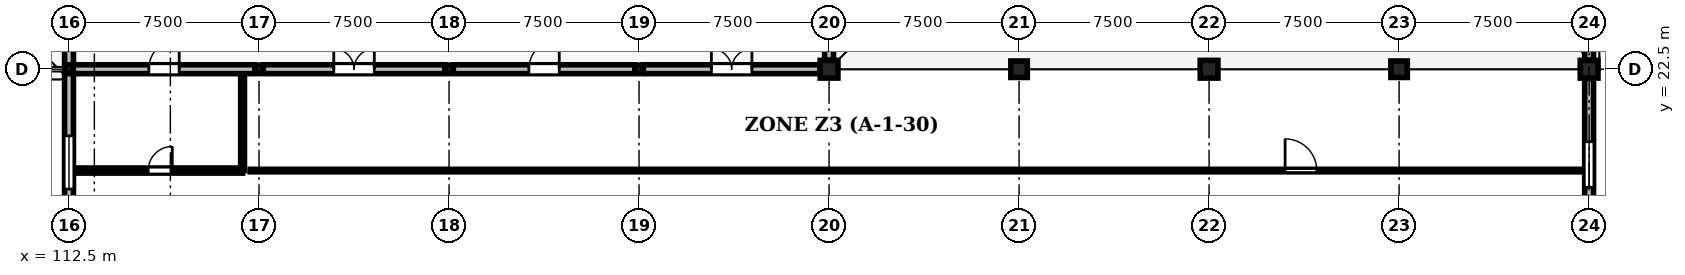
"""IFC4 building model, lengths in metres.
Left out: names, types, materials, properties, quantities, classifications, styles, units other than length and angle.
Written with IfcOpenShell. Run it as: python <this file> out.ifc"""

import sys

from ifc_helpers import new_model, si_unit, direction, frame, frame_2d, origin, origin_2d, place, context, subcontext, project, spatial, rectangle, extrude, element, fill, save


model = new_model("IFC4")
c1 = context("Model", 3, precision=1e-05, world=origin(), true_north=direction((0.0, 1.0)))
c2 = subcontext(c1, "Body", "Model", "MODEL_VIEW")
j1 = project(units=[si_unit("LENGTHUNIT", "METRE"), si_unit("PLANEANGLEUNIT", "RADIAN")], contexts=[c1])
p1 = place(None, origin())
s1 = spatial("IfcSite", under=j1, at=p1, CompositionType="ELEMENT")
p2 = place(p1, origin())
s2 = spatial("IfcBuilding", under=s1, at=p2, CompositionType="ELEMENT")
p3 = place(p2, frame((0.0, 0.0, 9.3)))
s3 = spatial("IfcBuildingStorey", under=s2, at=p3, CompositionType="ELEMENT", Elevation=9.3)
for number, where, z_axis, x_axis in (
    (1, (112.5, 22.5, 0.0), (0.0, 0.0, 1.0), (1.0, 0.0, 0.0)),
    (2, (120.0, 22.5, 0.0), (0.0, 0.0, 1.0), (1.0, 0.0, 0.0)),
    (3, (127.5, 22.5, 0.0), (0.0, 0.0, 1.0), (1.0, 0.0, 0.0)),
    (4, (135.0, 22.5, 0.0), (0.0, 0.0, 1.0), (1.0, 0.0, 0.0)),
):
    element("IfcColumn", number, at=place(p3, frame(where, z_axis=z_axis, x_axis=x_axis)), inside=s3, PredefinedType="COLUMN", context=c2, shape_type="SweptSolid", body=[
        extrude(rectangle(XDim=0.32, YDim=0.32, at=origin_2d()), origin(), (0.0, 0.0, 1.0), 4.8),
    ])
p4 = place(p3, frame((142.5, 22.5, 0.0), z_axis=(0.0, 0.0, 1.0), x_axis=(1.0, 0.0, 0.0)))
e5 = element("IfcColumn", 5, at=p4, inside=s3, PredefinedType="COLUMN", context=c2, shape_type="SweptSolid", body=[
    extrude(rectangle(XDim=0.7, YDim=0.7, at=origin_2d()), origin(), (0.0, 0.0, 1.0), 4.8),
])
p5 = place(p3, frame((150.0, 22.5, 0.0), z_axis=(0.0, 0.0, 1.0), x_axis=(1.0, 0.0, 0.0)))
e6 = element("IfcColumn", 6, at=p5, inside=s3, PredefinedType="COLUMN", context=c2, shape_type="SweptSolid", body=[
    extrude(rectangle(XDim=0.65, YDim=0.65, at=origin_2d()), origin(), (0.0, 0.0, 1.0), 4.8),
])
p6 = place(p3, frame((157.5, 22.5, 0.0), z_axis=(0.0, 0.0, 1.0), x_axis=(1.0, 0.0, 0.0)))
e7 = element("IfcColumn", 7, at=p6, inside=s3, PredefinedType="COLUMN", context=c2, shape_type="SweptSolid", body=[
    extrude(rectangle(XDim=0.7, YDim=0.7, at=origin_2d()), origin(), (0.0, 0.0, 1.0), 4.8),
])
p7 = place(p3, frame((165.0, 22.5, 0.0), z_axis=(0.0, 0.0, 1.0), x_axis=(1.0, 0.0, 0.0)))
e8 = element("IfcColumn", 8, at=p7, inside=s3, PredefinedType="COLUMN", context=c2, shape_type="SweptSolid", body=[
    extrude(rectangle(XDim=0.65, YDim=0.65, at=origin_2d()), origin(), (0.0, 0.0, 1.0), 4.8),
])
p8 = place(p3, frame((172.5, 22.5, 0.0), z_axis=(0.0, 0.0, 1.0), x_axis=(1.0, 0.0, 0.0)))
e9 = element("IfcColumn", 9, at=p8, inside=s3, PredefinedType="COLUMN", context=c2, shape_type="SweptSolid", body=[
    extrude(rectangle(XDim=0.7, YDim=0.7, at=origin_2d()), origin(), (0.0, 0.0, 1.0), 4.8),
])
p9 = place(p3, frame((112.5, 31.265, 0.0), z_axis=(0.0, 0.0, 1.0), x_axis=(0.0, -1.0, 0.0)))
e10 = element("IfcWall", 10, at=p9, inside=s3, PredefinedType="STANDARD", context=c2, shape_type="SweptSolid", body=[
    extrude(rectangle(XDim=8.595, YDim=0.35, at=frame_2d((4.297, 0.0))), origin(), (0.0, 0.0, 1.0), 4.55),
])
p10 = place(p9, frame((3.698, 0.0, 0.0)))
e11 = element("IfcOpeningElement", 11, at=p10, cuts=e10, PredefinedType="OPENING", context=c2, shape_type="SweptSolid", body=[
    extrude(rectangle(XDim=1.2, YDim=2.3, at=frame_2d((0.6, 1.15))), frame((0.0, 0.185, 0.0), z_axis=(0.0, -1.0, 0.0), x_axis=(1.0, 0.0, 0.0)), (0.0, 0.0, 1.0), 0.37),
])
p11 = place(p3, frame((112.67, 22.5, 0.0), z_axis=(0.0, 0.0, 1.0), x_axis=(1.0, 0.0, 0.0)))
e12 = element("IfcWall", 12, at=p11, inside=s3, PredefinedType="STANDARD", context=c2, shape_type="SweptSolid", body=[
    extrude(rectangle(XDim=7.16, YDim=0.35, at=frame_2d((3.58, 0.0))), origin(), (0.0, 0.0, 1.0), 3.95),
])
p12 = place(p11, frame((2.98, 0.0, 0.0)))
e13 = element("IfcOpeningElement", 13, at=p12, cuts=e12, PredefinedType="OPENING", context=c2, shape_type="SweptSolid", body=[
    extrude(rectangle(XDim=1.2, YDim=2.3, at=frame_2d((0.6, 1.15))), frame((0.0, 0.185, 0.0), z_axis=(0.0, -1.0, 0.0), x_axis=(1.0, 0.0, 0.0)), (0.0, 0.0, 1.0), 0.37),
])
p13 = place(p3, frame((112.5, 15.31, 0.0), z_axis=(0.0, 0.0, 1.0), x_axis=(0.0, 1.0, 0.0)))
e14 = element("IfcWall", 14, at=p13, inside=s3, PredefinedType="STANDARD", context=c2, shape_type="SweptSolid", body=[
    extrude(rectangle(XDim=7.02, YDim=0.35, at=frame_2d((3.51, 0.0))), origin(), (0.0, 0.0, 1.0), 3.95),
])
p14 = place(p13, frame((2.46, 0.0, 0.9)))
e15 = element("IfcOpeningElement", 15, at=p14, cuts=e14, PredefinedType="OPENING", context=c2, shape_type="SweptSolid", body=[
    extrude(rectangle(XDim=2.1, YDim=2.1, at=frame_2d((1.05, 1.05))), frame((0.0, 0.185, 0.0), z_axis=(0.0, -1.0, 0.0), x_axis=(1.0, 0.0, 0.0)), (0.0, 0.0, 1.0), 0.37),
])
p15 = place(p3, frame((120.17, 22.5, 0.0), z_axis=(0.0, 0.0, 1.0), x_axis=(1.0, 0.0, 0.0)))
e16 = element("IfcWall", 16, at=p15, inside=s3, PredefinedType="STANDARD", context=c2, shape_type="SweptSolid", body=[
    extrude(rectangle(XDim=7.16, YDim=0.35, at=frame_2d((3.58, 0.0))), origin(), (0.0, 0.0, 1.0), 3.95),
])
p16 = place(p15, frame((2.78, 0.0, 0.0)))
e17 = element("IfcOpeningElement", 17, at=p16, cuts=e16, PredefinedType="OPENING", context=c2, shape_type="SweptSolid", body=[
    extrude(rectangle(XDim=1.6, YDim=2.35, at=frame_2d((0.8, 1.175))), frame((0.0, 0.185, 0.0), z_axis=(0.0, -1.0, 0.0), x_axis=(1.0, 0.0, 0.0)), (0.0, 0.0, 1.0), 0.37),
])
p17 = place(p3, frame((127.67, 22.5, 0.0), z_axis=(0.0, 0.0, 1.0), x_axis=(1.0, 0.0, 0.0)))
e18 = element("IfcWall", 18, at=p17, inside=s3, PredefinedType="STANDARD", context=c2, shape_type="SweptSolid", body=[
    extrude(rectangle(XDim=7.16, YDim=0.35, at=frame_2d((3.58, 0.0))), origin(), (0.0, 0.0, 1.0), 3.95),
])
p18 = place(p17, frame((2.98, 0.0, 0.0)))
e19 = element("IfcOpeningElement", 19, at=p18, cuts=e18, PredefinedType="OPENING", context=c2, shape_type="SweptSolid", body=[
    extrude(rectangle(XDim=1.2, YDim=2.3, at=frame_2d((0.6, 1.15))), frame((0.0, 0.185, 0.0), z_axis=(0.0, -1.0, 0.0), x_axis=(1.0, 0.0, 0.0)), (0.0, 0.0, 1.0), 0.37),
])
p19 = place(p3, frame((135.17, 22.5, 0.0), z_axis=(0.0, 0.0, 1.0), x_axis=(1.0, 0.0, 0.0)))
e20 = element("IfcWall", 20, at=p19, inside=s3, PredefinedType="STANDARD", context=c2, shape_type="SweptSolid", body=[
    extrude(rectangle(XDim=6.97, YDim=0.35, at=frame_2d((3.485, 0.0))), origin(), (0.0, 0.0, 1.0), 3.95),
])
p20 = place(p19, frame((2.685, 0.0, 0.0)))
e21 = element("IfcOpeningElement", 21, at=p20, cuts=e20, PredefinedType="OPENING", context=c2, shape_type="SweptSolid", body=[
    extrude(rectangle(XDim=1.6, YDim=2.35, at=frame_2d((0.8, 1.175))), frame((0.0, 0.185, 0.0), z_axis=(0.0, -1.0, 0.0), x_axis=(1.0, 0.0, 0.0)), (0.0, 0.0, 1.0), 0.37),
])
p21 = place(p3, frame((142.5, 22.86, 0.0), z_axis=(0.0, 0.0, 1.0), x_axis=(0.0, 1.0, 0.0)))
e22 = element("IfcWall", 22, at=p21, inside=s3, PredefinedType="STANDARD", context=c2, shape_type="SweptSolid", body=[
    extrude(rectangle(XDim=8.33, YDim=0.35, at=frame_2d((4.165, 0.0))), origin(), (0.0, 0.0, 1.0), 4.55),
])
p22 = place(p21, frame((3.565, 0.0, 0.0)))
e23 = element("IfcOpeningElement", 23, at=p22, cuts=e22, PredefinedType="OPENING", context=c2, shape_type="SweptSolid", body=[
    extrude(rectangle(XDim=1.2, YDim=2.3, at=frame_2d((0.6, 1.15))), frame((0.0, 0.185, 0.0), z_axis=(0.0, -1.0, 0.0), x_axis=(1.0, 0.0, 0.0)), (0.0, 0.0, 1.0), 0.37),
])
p23 = place(p3, frame((172.5, 22.14, 0.0), z_axis=(0.0, 0.0, 1.0), x_axis=(0.0, -1.0, 0.0)))
e24 = element("IfcWall", 24, at=p23, inside=s3, PredefinedType="STANDARD", context=c2, shape_type="SweptSolid", body=[
    extrude(rectangle(XDim=6.805, YDim=0.35, at=frame_2d((3.402, 0.0))), origin(), (0.0, 0.0, 1.0), 3.95),
])
p24 = place(p23, frame((2.502, 0.0, 0.9)))
e25 = element("IfcOpeningElement", 25, at=p24, cuts=e24, PredefinedType="OPENING", context=c2, shape_type="SweptSolid", body=[
    extrude(rectangle(XDim=1.8, YDim=1.8, at=frame_2d((0.9, 0.9))), frame((0.0, 0.185, 0.0), z_axis=(0.0, -1.0, 0.0), x_axis=(1.0, 0.0, 0.0)), (0.0, 0.0, 1.0), 0.37),
])
p25 = place(p3, frame((172.5, 31.19, 0.0), z_axis=(0.0, 0.0, 1.0), x_axis=(0.0, -1.0, 0.0)))
e26 = element("IfcWall", 26, at=p25, inside=s3, PredefinedType="STANDARD", context=c2, shape_type="SweptSolid", body=[
    extrude(rectangle(XDim=8.33, YDim=0.35, at=frame_2d((4.165, 0.0))), origin(), (0.0, 0.0, 1.0), 4.55),
])
p26 = place(p25, frame((3.265, 0.0, 0.9)))
e27 = element("IfcOpeningElement", 27, at=p26, cuts=e26, PredefinedType="OPENING", context=c2, shape_type="SweptSolid", body=[
    extrude(rectangle(XDim=1.8, YDim=2.4, at=frame_2d((0.9, 1.2))), frame((0.0, 0.185, 0.0), z_axis=(0.0, -1.0, 0.0), x_axis=(1.0, 0.0, 0.0)), (0.0, 0.0, 1.0), 0.37),
])
p27 = place(p3, frame((112.85, 18.5, 0.0), z_axis=(0.0, 0.0, 1.0), x_axis=(1.0, 0.0, 0.0)))
e28 = element("IfcWall", 28, at=p27, inside=s3, PredefinedType="STANDARD", context=c2, shape_type="SweptSolid", body=[
    extrude(rectangle(XDim=6.5, YDim=0.2, at=frame_2d((3.25, 0.0))), origin(), (0.0, 0.0, 1.0), 4.535),
])
p28 = place(p27, frame((2.775, 0.0, 0.0)))
e29 = element("IfcOpeningElement", 29, at=p28, cuts=e28, PredefinedType="OPENING", context=c2, shape_type="SweptSolid", body=[
    extrude(rectangle(XDim=0.95, YDim=2.15, at=frame_2d((0.475, 1.075))), frame((0.0, 0.11, 0.0), z_axis=(0.0, -1.0, 0.0), x_axis=(1.0, 0.0, 0.0)), (0.0, 0.0, 1.0), 0.22),
])
p29 = place(p3, frame((119.65, 18.5, 0.0), z_axis=(0.0, 0.0, 1.0), x_axis=(1.0, 0.0, 0.0)))
e30 = element("IfcWall", 30, at=p29, inside=s3, PredefinedType="PARTITIONING", context=c2, shape_type="SweptSolid", body=[
    extrude(rectangle(XDim=52.5, YDim=0.1, at=frame_2d((26.25, 0.0))), origin(), (0.0, 0.0, 1.0), 4.535),
])
p30 = place(p29, frame((40.85, 0.0, 0.0)))
e31 = element("IfcOpeningElement", 31, at=p30, cuts=e30, PredefinedType="OPENING", context=c2, shape_type="SweptSolid", body=[
    extrude(rectangle(XDim=1.25, YDim=2.2, at=frame_2d((0.625, 1.1))), frame((0.0, 0.06, 0.0), z_axis=(0.0, -1.0, 0.0), x_axis=(1.0, 0.0, 0.0)), (0.0, 0.0, 1.0), 0.12),
])
p31 = place(p3, frame((119.35, 18.5, 0.0), z_axis=(0.0, 0.0, 1.0), x_axis=(0.0, 1.0, 0.0)))
e32 = element("IfcWall", 32, at=p31, inside=s3, PredefinedType="PARTITIONING", context=c2, shape_type="SweptSolid", body=[
    extrude(rectangle(XDim=3.65, YDim=0.15, at=frame_2d((1.825, 0.0))), origin(), (0.0, 0.0, 1.0), 4.535),
])
p32 = place(p12, origin())
e33 = element("IfcDoor", 33, at=p32, inside=s3, OperationType="SINGLE_SWING_RIGHT", PredefinedType="DOOR", context=c2, shape_type="SweptSolid", body=[
    extrude(rectangle(XDim=1.2, YDim=2.3, at=frame_2d((0.6, 1.15))), frame((0.0, 0.025, 0.0), z_axis=(0.0, -1.0, 0.0), x_axis=(1.0, 0.0, 0.0)), (0.0, 0.0, 1.0), 0.05),
])
fill(e13, e33)
p33 = place(p14, origin())
e34 = element("IfcWindow", 34, at=p33, inside=s3, PartitioningType="SINGLE_PANEL", PredefinedType="WINDOW", context=c2, shape_type="SweptSolid", body=[
    extrude(rectangle(XDim=2.1, YDim=2.1, at=frame_2d((1.05, 1.05))), frame((0.0, 0.03, 0.0), z_axis=(0.0, -1.0, 0.0), x_axis=(1.0, 0.0, 0.0)), (0.0, 0.0, 1.0), 0.06),
])
fill(e15, e34)
p34 = place(p16, origin())
e35 = element("IfcDoor", 35, at=p34, inside=s3, OperationType="DOUBLE_DOOR_SINGLE_SWING", PredefinedType="DOOR", context=c2, shape_type="SweptSolid", body=[
    extrude(rectangle(XDim=1.6, YDim=2.35, at=frame_2d((0.8, 1.175))), frame((0.0, 0.025, 0.0), z_axis=(0.0, -1.0, 0.0), x_axis=(1.0, 0.0, 0.0)), (0.0, 0.0, 1.0), 0.05),
])
fill(e17, e35)
p35 = place(p18, origin())
e36 = element("IfcDoor", 36, at=p35, inside=s3, OperationType="SINGLE_SWING_RIGHT", PredefinedType="DOOR", context=c2, shape_type="SweptSolid", body=[
    extrude(rectangle(XDim=1.2, YDim=2.3, at=frame_2d((0.6, 1.15))), frame((0.0, 0.025, 0.0), z_axis=(0.0, -1.0, 0.0), x_axis=(1.0, 0.0, 0.0)), (0.0, 0.0, 1.0), 0.05),
])
fill(e19, e36)
p36 = place(p20, origin())
e37 = element("IfcDoor", 37, at=p36, inside=s3, OperationType="DOUBLE_DOOR_SINGLE_SWING", PredefinedType="DOOR", context=c2, shape_type="SweptSolid", body=[
    extrude(rectangle(XDim=1.6, YDim=2.35, at=frame_2d((0.8, 1.175))), frame((0.0, 0.025, 0.0), z_axis=(0.0, -1.0, 0.0), x_axis=(1.0, 0.0, 0.0)), (0.0, 0.0, 1.0), 0.05),
])
fill(e21, e37)
p37 = place(p24, origin())
e38 = element("IfcWindow", 38, at=p37, inside=s3, PartitioningType="SINGLE_PANEL", PredefinedType="WINDOW", context=c2, shape_type="SweptSolid", body=[
    extrude(rectangle(XDim=1.8, YDim=1.8, at=frame_2d((0.9, 0.9))), frame((0.0, 0.03, 0.0), z_axis=(0.0, -1.0, 0.0), x_axis=(1.0, 0.0, 0.0)), (0.0, 0.0, 1.0), 0.06),
])
fill(e25, e38)
p38 = place(p28, origin())
e39 = element("IfcDoor", 39, at=p38, inside=s3, OperationType="SINGLE_SWING_RIGHT", PredefinedType="DOOR", context=c2, shape_type="SweptSolid", body=[
    extrude(rectangle(XDim=0.95, YDim=2.15, at=frame_2d((0.475, 1.075))), frame((0.0, 0.025, 0.0), z_axis=(0.0, -1.0, 0.0), x_axis=(1.0, 0.0, 0.0)), (0.0, 0.0, 1.0), 0.05),
])
fill(e29, e39)
p39 = place(p30, origin())
e40 = element("IfcDoor", 40, at=p39, inside=s3, OperationType="SINGLE_SWING_LEFT", PredefinedType="DOOR", context=c2, shape_type="SweptSolid", body=[
    extrude(rectangle(XDim=1.25, YDim=2.2, at=frame_2d((0.625, 1.1))), frame((0.0, 0.025, 0.0), z_axis=(0.0, -1.0, 0.0), x_axis=(1.0, 0.0, 0.0)), (0.0, 0.0, 1.0), 0.05),
])
fill(e31, e40)
save(model, sys.argv[1])
